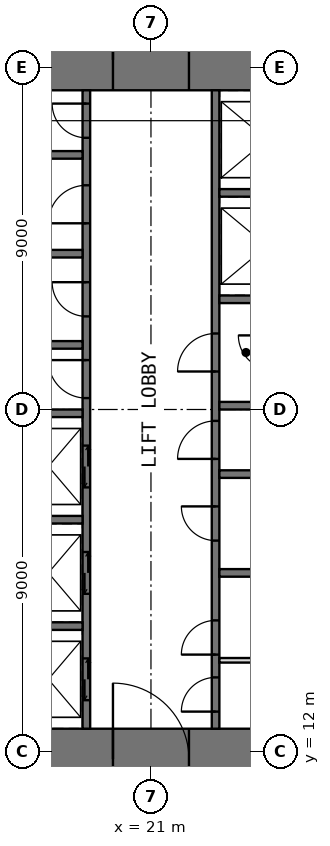
"""IFC4 building model, lengths in metres.
Left out: names, types, materials, properties, quantities, classifications, styles, units other than length and angle.
Written with IfcOpenShell. Run it as: python <this file> out.ifc"""

import sys

from ifc_helpers import new_model, si_unit, direction, frame, frame_2d, origin, place, context, subcontext, project, spatial, rectangle, extrude, element, fill, save


model = new_model("IFC4")
c1 = context("Model", 3, precision=1e-05, world=origin(), true_north=direction((0.0, 1.0)))
c2 = subcontext(c1, "Body", "Model", "MODEL_VIEW")
j1 = project(units=[si_unit("LENGTHUNIT", "METRE"), si_unit("PLANEANGLEUNIT", "RADIAN")], contexts=[c1])
p1 = place(None, origin())
s1 = spatial("IfcSite", under=j1, at=p1, CompositionType="ELEMENT")
p2 = place(p1, origin())
s2 = spatial("IfcBuilding", under=s1, at=p2, CompositionType="ELEMENT")
p3 = place(p2, frame((0.0, 0.0, 136.5)))
s3 = spatial("IfcBuildingStorey", under=s2, at=p3, CompositionType="ELEMENT", Elevation=136.5)
p4 = place(p3, frame((11.0, 11.8, -0.05), z_axis=(0.0, 0.0, 1.0), x_axis=(1.0, 0.0, 0.0)))
e1 = element("IfcWall", 1, at=p4, inside=s3, PredefinedType="SHEAR", context=c2, shape_type="SweptSolid", body=[
    extrude(rectangle(XDim=20.0, YDim=1.6, at=frame_2d((10.0, 0.0))), origin(), (0.0, 0.0, 1.0), 4.0),
])
p5 = place(p4, frame((9.0, 0.0, 0.05)))
e2 = element("IfcOpeningElement", 2, at=p5, cuts=e1, PredefinedType="OPENING", context=c2, shape_type="SweptSolid", body=[
    extrude(rectangle(XDim=2.0, YDim=2.2, at=frame_2d((1.0, 1.1))), frame((0.0, 0.81, 0.0), z_axis=(0.0, -1.0, 0.0), x_axis=(1.0, 0.0, 0.0)), (0.0, 0.0, 1.0), 1.62),
])
p6 = place(p3, frame((11.0, 30.2, -0.05), z_axis=(0.0, 0.0, 1.0), x_axis=(1.0, 0.0, 0.0)))
e3 = element("IfcWall", 3, at=p6, inside=s3, PredefinedType="SHEAR", context=c2, shape_type="SweptSolid", body=[
    extrude(rectangle(XDim=20.0, YDim=1.6, at=frame_2d((10.0, 0.0))), origin(), (0.0, 0.0, 1.0), 4.0),
])
p7 = place(p6, frame((9.0, 0.0, 0.05)))
e4 = element("IfcOpeningElement", 4, at=p7, cuts=e3, PredefinedType="OPENING", context=c2, shape_type="SweptSolid", body=[
    extrude(rectangle(XDim=2.0, YDim=2.2, at=frame_2d((1.0, 1.1))), frame((0.0, 0.81, 0.0), z_axis=(0.0, -1.0, 0.0), x_axis=(1.0, 0.0, 0.0)), (0.0, 0.0, 1.0), 1.62),
])
p8 = place(p3, frame((19.3, 12.6, -0.05), z_axis=(0.0, 0.0, 1.0), x_axis=(0.0, 1.0, 0.0)))
e5 = element("IfcWall", 5, at=p8, inside=s3, PredefinedType="SHEAR", context=c2, shape_type="SweptSolid", body=[
    extrude(rectangle(XDim=16.8, YDim=0.2, at=frame_2d((8.4, 0.0))), origin(), (0.0, 0.0, 1.0), 4.0),
])
p9 = place(p8, frame((8.7, 0.0, 0.05)))
e6 = element("IfcOpeningElement", 6, at=p9, cuts=e5, PredefinedType="OPENING", context=c2, shape_type="SweptSolid", body=[
    extrude(rectangle(XDim=1.0, YDim=2.2, at=frame_2d((0.5, 1.1))), frame((0.0, 0.11, 0.0), z_axis=(0.0, -1.0, 0.0), x_axis=(1.0, 0.0, 0.0)), (0.0, 0.0, 1.0), 0.22),
])
p10 = place(p8, frame((10.85, 0.0, 0.05)))
e7 = element("IfcOpeningElement", 7, at=p10, cuts=e5, PredefinedType="OPENING", context=c2, shape_type="SweptSolid", body=[
    extrude(rectangle(XDim=0.9, YDim=2.2, at=frame_2d((0.45, 1.1))), frame((0.0, 0.11, 0.0), z_axis=(0.0, -1.0, 0.0), x_axis=(1.0, 0.0, 0.0)), (0.0, 0.0, 1.0), 0.22),
])
p11 = place(p8, frame((13.3, 0.0, 0.05)))
e8 = element("IfcOpeningElement", 8, at=p11, cuts=e5, PredefinedType="OPENING", context=c2, shape_type="SweptSolid", body=[
    extrude(rectangle(XDim=1.0, YDim=2.2, at=frame_2d((0.5, 1.1))), frame((0.0, 0.11, 0.0), z_axis=(0.0, -1.0, 0.0), x_axis=(1.0, 0.0, 0.0)), (0.0, 0.0, 1.0), 0.22),
])
p12 = place(p8, frame((15.55, 0.0, 0.05)))
e9 = element("IfcOpeningElement", 9, at=p12, cuts=e5, PredefinedType="OPENING", context=c2, shape_type="SweptSolid", body=[
    extrude(rectangle(XDim=0.9, YDim=2.2, at=frame_2d((0.45, 1.1))), frame((0.0, 0.11, 0.0), z_axis=(0.0, -1.0, 0.0), x_axis=(1.0, 0.0, 0.0)), (0.0, 0.0, 1.0), 0.22),
])
p13 = place(p8, frame((0.75, 0.0, 0.05)))
e10 = element("IfcOpeningElement", 10, at=p13, cuts=e5, PredefinedType="OPENING", context=c2, shape_type="SweptSolid", body=[
    extrude(rectangle(XDim=1.1, YDim=2.2, at=frame_2d((0.55, 1.1))), frame((0.0, 0.11, 0.0), z_axis=(0.0, -1.0, 0.0), x_axis=(1.0, 0.0, 0.0)), (0.0, 0.0, 1.0), 0.22),
])
p14 = place(p8, frame((3.55, 0.0, 0.05)))
e11 = element("IfcOpeningElement", 11, at=p14, cuts=e5, PredefinedType="OPENING", context=c2, shape_type="SweptSolid", body=[
    extrude(rectangle(XDim=1.1, YDim=2.2, at=frame_2d((0.55, 1.1))), frame((0.0, 0.11, 0.0), z_axis=(0.0, -1.0, 0.0), x_axis=(1.0, 0.0, 0.0)), (0.0, 0.0, 1.0), 0.22),
])
p15 = place(p8, frame((6.35, 0.0, 0.05)))
e12 = element("IfcOpeningElement", 12, at=p15, cuts=e5, PredefinedType="OPENING", context=c2, shape_type="SweptSolid", body=[
    extrude(rectangle(XDim=1.1, YDim=2.2, at=frame_2d((0.55, 1.1))), frame((0.0, 0.11, 0.0), z_axis=(0.0, -1.0, 0.0), x_axis=(1.0, 0.0, 0.0)), (0.0, 0.0, 1.0), 0.22),
])
p16 = place(p3, frame((22.7, 12.6, -0.05), z_axis=(0.0, 0.0, 1.0), x_axis=(0.0, 1.0, 0.0)))
e13 = element("IfcWall", 13, at=p16, inside=s3, PredefinedType="SHEAR", context=c2, shape_type="SweptSolid", body=[
    extrude(rectangle(XDim=16.8, YDim=0.2, at=frame_2d((8.4, 0.0))), origin(), (0.0, 0.0, 1.0), 4.0),
])
p17 = place(p16, frame((0.45, 0.0, 0.05)))
e14 = element("IfcOpeningElement", 14, at=p17, cuts=e13, PredefinedType="OPENING", context=c2, shape_type="SweptSolid", body=[
    extrude(rectangle(XDim=0.9, YDim=2.2, at=frame_2d((0.45, 1.1))), frame((0.0, 0.11, 0.0), z_axis=(0.0, -1.0, 0.0), x_axis=(1.0, 0.0, 0.0)), (0.0, 0.0, 1.0), 0.22),
])
p18 = place(p16, frame((7.1, 0.0, 0.05)))
e15 = element("IfcOpeningElement", 15, at=p18, cuts=e13, PredefinedType="OPENING", context=c2, shape_type="SweptSolid", body=[
    extrude(rectangle(XDim=1.0, YDim=2.2, at=frame_2d((0.5, 1.1))), frame((0.0, 0.11, 0.0), z_axis=(0.0, -1.0, 0.0), x_axis=(1.0, 0.0, 0.0)), (0.0, 0.0, 1.0), 0.22),
])
p19 = place(p16, frame((1.95, 0.0, 0.05)))
e16 = element("IfcOpeningElement", 16, at=p19, cuts=e13, PredefinedType="OPENING", context=c2, shape_type="SweptSolid", body=[
    extrude(rectangle(XDim=0.9, YDim=2.2, at=frame_2d((0.45, 1.1))), frame((0.0, 0.11, 0.0), z_axis=(0.0, -1.0, 0.0), x_axis=(1.0, 0.0, 0.0)), (0.0, 0.0, 1.0), 0.22),
])
p20 = place(p16, frame((4.95, 0.0, 0.05)))
e17 = element("IfcOpeningElement", 17, at=p20, cuts=e13, PredefinedType="OPENING", context=c2, shape_type="SweptSolid", body=[
    extrude(rectangle(XDim=0.9, YDim=2.2, at=frame_2d((0.45, 1.1))), frame((0.0, 0.11, 0.0), z_axis=(0.0, -1.0, 0.0), x_axis=(1.0, 0.0, 0.0)), (0.0, 0.0, 1.0), 0.22),
])
p21 = place(p16, frame((9.4, 0.0, 0.05)))
e18 = element("IfcOpeningElement", 18, at=p21, cuts=e13, PredefinedType="OPENING", context=c2, shape_type="SweptSolid", body=[
    extrude(rectangle(XDim=1.0, YDim=2.2, at=frame_2d((0.5, 1.1))), frame((0.0, 0.11, 0.0), z_axis=(0.0, -1.0, 0.0), x_axis=(1.0, 0.0, 0.0)), (0.0, 0.0, 1.0), 0.22),
])
for number, where, z_axis, x_axis in (
    (19, (16.0, 15.3, -0.05), (0.0, 0.0, 1.0), (1.0, 0.0, 0.0)),
    (20, (16.0, 18.1, -0.05), (0.0, 0.0, 1.0), (1.0, 0.0, 0.0)),
    (21, (16.0, 20.9, -0.05), (0.0, 0.0, 1.0), (1.0, 0.0, 0.0)),
    (22, (16.0, 22.7, -0.05), (0.0, 0.0, 1.0), (1.0, 0.0, 0.0)),
    (23, (16.0, 25.1, -0.05), (0.0, 0.0, 1.0), (1.0, 0.0, 0.0)),
    (24, (16.0, 27.7, -0.05), (0.0, 0.0, 1.0), (1.0, 0.0, 0.0)),
    (25, (22.8, 16.7, -0.05), (0.0, 0.0, 1.0), (1.0, 0.0, 0.0)),
    (26, (22.8, 19.3, -0.05), (0.0, 0.0, 1.0), (1.0, 0.0, 0.0)),
    (27, (22.8, 21.1, -0.05), (0.0, 0.0, 1.0), (1.0, 0.0, 0.0)),
    (28, (22.8, 23.9, -0.05), (0.0, 0.0, 1.0), (1.0, 0.0, 0.0)),
    (29, (22.8, 26.7, -0.05), (0.0, 0.0, 1.0), (1.0, 0.0, 0.0)),
):
    element("IfcWall", number, at=place(p3, frame(where, z_axis=z_axis, x_axis=x_axis)), inside=s3, PredefinedType="SHEAR", context=c2, shape_type="SweptSolid", body=[
        extrude(rectangle(XDim=3.2, YDim=0.2, at=frame_2d((1.6, 0.0))), origin(), (0.0, 0.0, 1.0), 4.0),
    ])
p22 = place(p3, frame((22.8, 14.4, 0.0), z_axis=(0.0, 0.0, 1.0), x_axis=(1.0, 0.0, 0.0)))
e30 = element("IfcWall", 30, at=p22, inside=s3, PredefinedType="PARTITIONING", context=c2, shape_type="SweptSolid", body=[
    extrude(rectangle(XDim=3.2, YDim=0.12, at=frame_2d((1.6, 0.0))), origin(), (0.0, 0.0, 1.0), 3.75),
])
p23 = place(p5, origin())
e31 = element("IfcDoor", 31, at=p23, inside=s3, OperationType="DOUBLE_DOOR_SINGLE_SWING", PredefinedType="DOOR", context=c2, shape_type="SweptSolid", body=[
    extrude(rectangle(XDim=2.0, YDim=2.2, at=frame_2d((1.0, 1.1))), frame((0.0, 0.025, 0.0), z_axis=(0.0, -1.0, 0.0), x_axis=(1.0, 0.0, 0.0)), (0.0, 0.0, 1.0), 0.05),
])
fill(e2, e31)
p24 = place(p7, origin())
e32 = element("IfcDoor", 32, at=p24, inside=s3, OperationType="DOUBLE_DOOR_SINGLE_SWING", PredefinedType="DOOR", context=c2, shape_type="SweptSolid", body=[
    extrude(rectangle(XDim=2.0, YDim=2.2, at=frame_2d((1.0, 1.1))), frame((0.0, 0.025, 0.0), z_axis=(0.0, -1.0, 0.0), x_axis=(1.0, 0.0, 0.0)), (0.0, 0.0, 1.0), 0.05),
])
fill(e4, e32)
p25 = place(p17, origin())
e33 = element("IfcDoor", 33, at=p25, inside=s3, OperationType="SINGLE_SWING_LEFT", PredefinedType="DOOR", context=c2, shape_type="SweptSolid", body=[
    extrude(rectangle(XDim=0.9, YDim=2.2, at=frame_2d((0.45, 1.1))), frame((0.0, 0.025, 0.0), z_axis=(0.0, -1.0, 0.0), x_axis=(1.0, 0.0, 0.0)), (0.0, 0.0, 1.0), 0.05),
])
fill(e14, e33)
p26 = place(p9, origin())
e34 = element("IfcDoor", 34, at=p26, inside=s3, OperationType="SINGLE_SWING_RIGHT", PredefinedType="DOOR", context=c2, shape_type="SweptSolid", body=[
    extrude(rectangle(XDim=1.0, YDim=2.2, at=frame_2d((0.5, 1.1))), frame((0.0, 0.025, 0.0), z_axis=(0.0, -1.0, 0.0), x_axis=(1.0, 0.0, 0.0)), (0.0, 0.0, 1.0), 0.05),
])
fill(e6, e34)
p27 = place(p18, origin())
e35 = element("IfcDoor", 35, at=p27, inside=s3, OperationType="SINGLE_SWING_LEFT", PredefinedType="DOOR", context=c2, shape_type="SweptSolid", body=[
    extrude(rectangle(XDim=1.0, YDim=2.2, at=frame_2d((0.5, 1.1))), frame((0.0, 0.025, 0.0), z_axis=(0.0, -1.0, 0.0), x_axis=(1.0, 0.0, 0.0)), (0.0, 0.0, 1.0), 0.05),
])
fill(e15, e35)
p28 = place(p10, origin())
e36 = element("IfcDoor", 36, at=p28, inside=s3, OperationType="SINGLE_SWING_RIGHT", PredefinedType="DOOR", context=c2, shape_type="SweptSolid", body=[
    extrude(rectangle(XDim=0.9, YDim=2.2, at=frame_2d((0.45, 1.1))), frame((0.0, 0.025, 0.0), z_axis=(0.0, -1.0, 0.0), x_axis=(1.0, 0.0, 0.0)), (0.0, 0.0, 1.0), 0.05),
])
fill(e7, e36)
p29 = place(p11, origin())
e37 = element("IfcDoor", 37, at=p29, inside=s3, OperationType="SINGLE_SWING_LEFT", PredefinedType="DOOR", context=c2, shape_type="SweptSolid", body=[
    extrude(rectangle(XDim=1.0, YDim=2.2, at=frame_2d((0.5, 1.1))), frame((0.0, 0.025, 0.0), z_axis=(0.0, -1.0, 0.0), x_axis=(1.0, 0.0, 0.0)), (0.0, 0.0, 1.0), 0.05),
])
fill(e8, e37)
p30 = place(p12, origin())
e38 = element("IfcDoor", 38, at=p30, inside=s3, OperationType="SINGLE_SWING_RIGHT", PredefinedType="DOOR", context=c2, shape_type="SweptSolid", body=[
    extrude(rectangle(XDim=0.9, YDim=2.2, at=frame_2d((0.45, 1.1))), frame((0.0, 0.025, 0.0), z_axis=(0.0, -1.0, 0.0), x_axis=(1.0, 0.0, 0.0)), (0.0, 0.0, 1.0), 0.05),
])
fill(e9, e38)
p31 = place(p19, origin())
e39 = element("IfcDoor", 39, at=p31, inside=s3, OperationType="SINGLE_SWING_LEFT", PredefinedType="DOOR", context=c2, shape_type="SweptSolid", body=[
    extrude(rectangle(XDim=0.9, YDim=2.2, at=frame_2d((0.45, 1.1))), frame((0.0, 0.025, 0.0), z_axis=(0.0, -1.0, 0.0), x_axis=(1.0, 0.0, 0.0)), (0.0, 0.0, 1.0), 0.05),
])
fill(e16, e39)
p32 = place(p20, origin())
e40 = element("IfcDoor", 40, at=p32, inside=s3, OperationType="SINGLE_SWING_RIGHT", PredefinedType="DOOR", context=c2, shape_type="SweptSolid", body=[
    extrude(rectangle(XDim=0.9, YDim=2.2, at=frame_2d((0.45, 1.1))), frame((0.0, 0.025, 0.0), z_axis=(0.0, -1.0, 0.0), x_axis=(1.0, 0.0, 0.0)), (0.0, 0.0, 1.0), 0.05),
])
fill(e17, e40)
p33 = place(p21, origin())
e41 = element("IfcDoor", 41, at=p33, inside=s3, OperationType="SINGLE_SWING_LEFT", PredefinedType="DOOR", context=c2, shape_type="SweptSolid", body=[
    extrude(rectangle(XDim=1.0, YDim=2.2, at=frame_2d((0.5, 1.1))), frame((0.0, 0.025, 0.0), z_axis=(0.0, -1.0, 0.0), x_axis=(1.0, 0.0, 0.0)), (0.0, 0.0, 1.0), 0.05),
])
fill(e18, e41)
p34 = place(p13, origin())
e42 = element("IfcDoor", 42, at=p34, inside=s3, OperationType="DOUBLE_DOOR_SLIDING", PredefinedType="DOOR", context=c2, shape_type="SweptSolid", body=[
    extrude(rectangle(XDim=1.1, YDim=2.2, at=frame_2d((0.55, 1.1))), frame((0.0, 0.025, 0.0), z_axis=(0.0, -1.0, 0.0), x_axis=(1.0, 0.0, 0.0)), (0.0, 0.0, 1.0), 0.05),
])
fill(e10, e42)
p35 = place(p14, origin())
e43 = element("IfcDoor", 43, at=p35, inside=s3, OperationType="DOUBLE_DOOR_SLIDING", PredefinedType="DOOR", context=c2, shape_type="SweptSolid", body=[
    extrude(rectangle(XDim=1.1, YDim=2.2, at=frame_2d((0.55, 1.1))), frame((0.0, 0.025, 0.0), z_axis=(0.0, -1.0, 0.0), x_axis=(1.0, 0.0, 0.0)), (0.0, 0.0, 1.0), 0.05),
])
fill(e11, e43)
p36 = place(p15, origin())
e44 = element("IfcDoor", 44, at=p36, inside=s3, OperationType="DOUBLE_DOOR_SLIDING", PredefinedType="DOOR", context=c2, shape_type="SweptSolid", body=[
    extrude(rectangle(XDim=1.1, YDim=2.2, at=frame_2d((0.55, 1.1))), frame((0.0, 0.025, 0.0), z_axis=(0.0, -1.0, 0.0), x_axis=(1.0, 0.0, 0.0)), (0.0, 0.0, 1.0), 0.05),
])
fill(e12, e44)
save(model, sys.argv[1])
